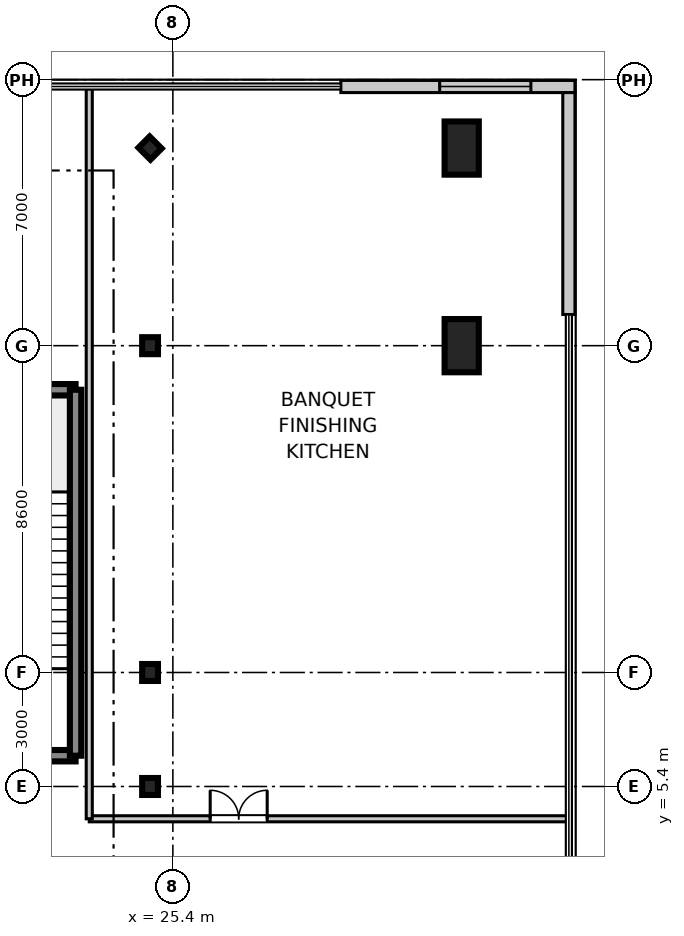
"""IFC4 building model, lengths in metres.
Left out: names, types, materials, properties, quantities, classifications, styles, units other than length and angle.
Written with IfcOpenShell. Run it as: python <this file> out.ifc"""

import sys

from ifc_helpers import new_model, si_unit, direction, frame, frame_2d, origin, origin_2d, place, context, subcontext, project, spatial, rectangle, i_section, extrude, source, transform, mapped, element, fill, save


model = new_model("IFC4")
c1 = context("Model", 3, precision=1e-05, world=origin(), true_north=direction((0.0, 1.0)))
c2 = subcontext(c1, "Body", "Model", "MODEL_VIEW")
j1 = project(units=[si_unit("LENGTHUNIT", "METRE"), si_unit("PLANEANGLEUNIT", "RADIAN")], contexts=[c1])
p1 = place(None, origin())
s1 = spatial("IfcSite", under=j1, at=p1, CompositionType="ELEMENT")
p2 = place(p1, origin())
s2 = spatial("IfcBuilding", under=s1, at=p2, CompositionType="ELEMENT")
p3 = place(p2, frame((0.0, 0.0, 16.2)))
s3 = spatial("IfcBuildingStorey", under=s2, at=p3, CompositionType="ELEMENT", Elevation=16.2)
m1 = source(origin(), c2, "Body", "SweptSolid", [
    extrude(rectangle(XDim=0.9, YDim=1.4, at=origin_2d()), origin(), (0.0, 0.0, 1.0), 5.355),
])
for number, where, z_axis, x_axis in (
    (1, (33.0, 17.0, 0.0), (0.0, 0.0, 1.0), (1.0, 0.0, 0.0)),
    (2, (33.0, 22.2, 0.0), (0.0, 0.0, 1.0), (1.0, 0.0, 0.0)),
):
    element("IfcColumn", number, at=place(p3, frame(where, z_axis=z_axis, x_axis=x_axis)), inside=s3, PredefinedType="PILASTER", context=c2, shape_type="MappedRepresentation", body=[
        mapped(m1, transform((0.0, 0.0, 0.0), scale=1.0)),
    ])
m2 = source(origin(), c2, "Body", "SweptSolid", [
    extrude(i_section(OverallWidth=0.416, OverallDepth=0.446, WebThickness=0.025, FlangeThickness=0.04, at=origin_2d()), origin(), (0.0, 0.0, 1.0), 5.355),
])
for number, where, z_axis, x_axis in (
    (3, (24.8, 5.4, 0.0), (0.0, 0.0, 1.0), (1.0, 0.0, 0.0)),
    (4, (24.8, 8.4, 0.0), (0.0, 0.0, 1.0), (1.0, 0.0, 0.0)),
    (5, (24.8, 17.0, 0.0), (0.0, 0.0, 1.0), (1.0, 0.0, 0.0)),
    (6, (24.8, 22.2, 0.0), (0.0, 0.0, 1.0), (0.707, 0.707, 0.0)),
):
    element("IfcColumn", number, at=place(p3, frame(where, z_axis=z_axis, x_axis=x_axis)), inside=s3, PredefinedType="COLUMN", context=c2, shape_type="MappedRepresentation", body=[
        mapped(m2, transform((0.0, 0.0, 0.0), scale=1.0)),
    ])
m3 = source(origin(), c2, "Body", "SweptSolid", [
    extrude(rectangle(XDim=4.78, YDim=0.3, at=frame_2d((2.39, 0.0))), origin(), (0.0, 0.0, 1.0), 5.08),
])
p4 = place(p3, frame((18.06, 6.21, 0.0), z_axis=(0.0, 0.0, 1.0), x_axis=(1.0, 0.0, 0.0)))
e7 = element("IfcWall", 7, at=p4, inside=s3, PredefinedType="SHEAR", context=c2, shape_type="MappedRepresentation", body=[
    mapped(m3, transform((0.0, 0.0, 0.0), scale=1.0)),
])
p5 = place(p4, frame((1.59, 0.0, 0.0)))
e8 = element("IfcOpeningElement", 8, at=p5, cuts=e7, PredefinedType="OPENING", context=c2, shape_type="SweptSolid", body=[
    extrude(rectangle(XDim=1.6, YDim=2.2, at=frame_2d((0.8, 1.1))), frame((0.0, 0.16, 0.0), z_axis=(0.0, -1.0, 0.0), x_axis=(1.0, 0.0, 0.0)), (0.0, 0.0, 1.0), 0.32),
])
p6 = place(p3, frame((18.06, 15.84, 0.0), z_axis=(0.0, 0.0, 1.0), x_axis=(1.0, 0.0, 0.0)))
e9 = element("IfcWall", 9, at=p6, inside=s3, PredefinedType="SHEAR", context=c2, shape_type="MappedRepresentation", body=[
    mapped(m3, transform((0.0, 0.0, 0.0), scale=1.0)),
])
m4 = source(origin(), c2, "Body", "SweptSolid", [
    extrude(rectangle(XDim=9.63, YDim=0.3, at=frame_2d((4.815, 0.0))), origin(), (0.0, 0.0, 1.0), 5.08),
])
p7 = place(p3, frame((22.84, 6.21, 0.0), z_axis=(0.0, 0.0, 1.0), x_axis=(0.0, 1.0, 0.0)))
e10 = element("IfcWall", 10, at=p7, inside=s3, PredefinedType="SHEAR", context=c2, shape_type="MappedRepresentation", body=[
    mapped(m4, transform((0.0, 0.0, 0.0), scale=1.0)),
])
m5 = source(origin(), c2, "Body", "SweptSolid", [
    extrude(rectangle(XDim=6.16, YDim=0.32, at=frame_2d((3.08, 0.0))), origin(), (0.0, 0.0, 1.0), 5.08),
])
p8 = place(p3, frame((29.82, 23.82, 0.0), z_axis=(0.0, 0.0, 1.0), x_axis=(1.0, 0.0, 0.0)))
e11 = element("IfcWall", 11, at=p8, inside=s3, PredefinedType="STANDARD", context=c2, shape_type="MappedRepresentation", body=[
    mapped(m5, transform((0.0, 0.0, 0.0), scale=1.0)),
])
p9 = place(p8, frame((2.6, 0.0, 0.9)))
e12 = element("IfcOpeningElement", 12, at=p9, cuts=e11, PredefinedType="OPENING", context=c2, shape_type="SweptSolid", body=[
    extrude(rectangle(XDim=2.4, YDim=2.2, at=frame_2d((1.2, 1.1))), frame((0.0, 0.17, 0.0), z_axis=(0.0, -1.0, 0.0), x_axis=(1.0, 0.0, 0.0)), (0.0, 0.0, 1.0), 0.34),
])
m6 = source(origin(), c2, "Body", "SweptSolid", [
    extrude(rectangle(XDim=5.84, YDim=0.32, at=frame_2d((2.92, 0.0))), origin(), (0.0, 0.0, 1.0), 5.08),
])
p10 = place(p3, frame((35.82, 17.82, 0.0), z_axis=(0.0, 0.0, 1.0), x_axis=(0.0, 1.0, 0.0)))
e13 = element("IfcWall", 13, at=p10, inside=s3, PredefinedType="STANDARD", context=c2, shape_type="MappedRepresentation", body=[
    mapped(m6, transform((0.0, 0.0, 0.0), scale=1.0)),
])
m7 = source(origin(), c2, "Body", "SweptSolid", [
    extrude(rectangle(XDim=12.56, YDim=0.16, at=frame_2d((6.28, 0.0))), origin(), (0.0, 0.0, 1.0), 3.4),
])
p11 = place(p3, frame((23.2, 4.55, 0.0), z_axis=(0.0, 0.0, 1.0), x_axis=(1.0, 0.0, 0.0)))
e14 = element("IfcWall", 14, at=p11, inside=s3, PredefinedType="PARTITIONING", context=c2, shape_type="MappedRepresentation", body=[
    mapped(m7, transform((0.0, 0.0, 0.0), scale=1.0)),
])
p12 = place(p11, frame((3.182, 0.0, 0.0)))
e15 = element("IfcOpeningElement", 15, at=p12, cuts=e14, PredefinedType="OPENING", context=c2, shape_type="SweptSolid", body=[
    extrude(rectangle(XDim=1.5, YDim=2.15, at=frame_2d((0.75, 1.075))), frame((0.0, 0.09, 0.0), z_axis=(0.0, -1.0, 0.0), x_axis=(1.0, 0.0, 0.0)), (0.0, 0.0, 1.0), 0.18),
])
m8 = source(origin(), c2, "Body", "SweptSolid", [
    extrude(rectangle(XDim=19.21, YDim=0.16, at=frame_2d((9.605, 0.0))), origin(), (0.0, 0.0, 1.0), 3.4),
])
p13 = place(p3, frame((23.2, 4.55, 0.0), z_axis=(0.0, 0.0, 1.0), x_axis=(0.0, 1.0, 0.0)))
e16 = element("IfcWall", 16, at=p13, inside=s3, PredefinedType="PARTITIONING", context=c2, shape_type="MappedRepresentation", body=[
    mapped(m8, transform((0.0, 0.0, 0.0), scale=1.0)),
])
m9 = source(origin(), c2, "Body", "SweptSolid", [
    extrude(rectangle(XDim=2.4, YDim=2.2, at=frame_2d((1.2, 1.1))), frame((0.0, 0.03, 0.0), z_axis=(0.0, -1.0, 0.0), x_axis=(1.0, 0.0, 0.0)), (0.0, 0.0, 1.0), 0.06),
])
p14 = place(p9, origin())
e17 = element("IfcWindow", 17, at=p14, inside=s3, PartitioningType="SINGLE_PANEL", PredefinedType="WINDOW", context=c2, shape_type="MappedRepresentation", body=[
    mapped(m9, transform((0.0, 0.0, 0.0), scale=1.0)),
])
fill(e12, e17)
m10 = source(origin(), c2, "Body", "SweptSolid", [
    extrude(rectangle(XDim=1.5, YDim=2.15, at=frame_2d((0.75, 1.075))), frame((0.0, 0.025, 0.0), z_axis=(0.0, -1.0, 0.0), x_axis=(1.0, 0.0, 0.0)), (0.0, 0.0, 1.0), 0.05),
])
p15 = place(p12, origin())
e18 = element("IfcDoor", 18, at=p15, inside=s3, OperationType="DOUBLE_DOOR_SINGLE_SWING", PredefinedType="DOOR", context=c2, shape_type="MappedRepresentation", body=[
    mapped(m10, transform((0.0, 0.0, 0.0), scale=1.0)),
])
fill(e15, e18)
save(model, sys.argv[1])
